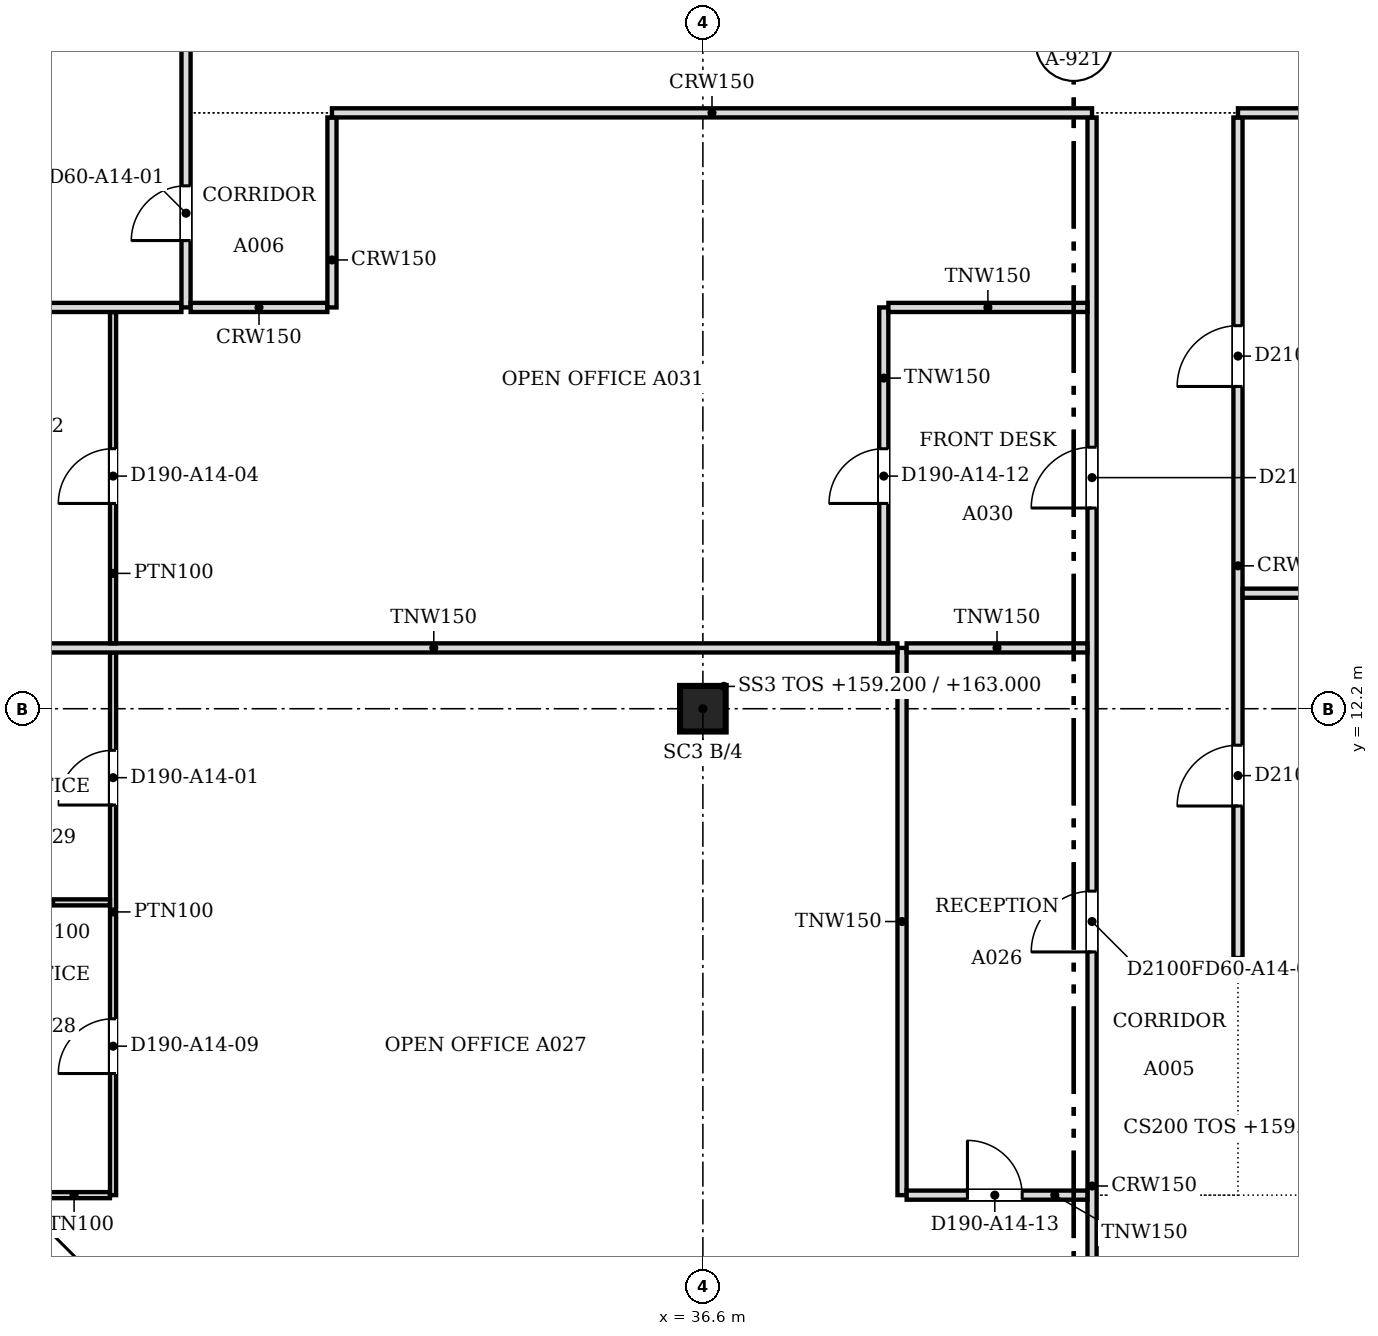
"""IFC4 building model, lengths in metres.
Left out: names, types, materials, properties, quantities, classifications, styles, units other than length and angle.
Written with IfcOpenShell. Run it as: python <this file> out.ifc"""

import sys

from ifc_helpers import new_model, si_unit, direction, frame, frame_2d, origin, origin_2d, place, context, subcontext, project, spatial, polyline, rectangle, outline, extrude, faceted_brep, source, transform, mapped, element, fill, save


model = new_model("IFC4")
c1 = context("Model", 3, precision=1e-05, world=origin(), true_north=direction((0.0, 1.0)))
c2 = subcontext(c1, "Body", "Model", "MODEL_VIEW")
j1 = project(units=[si_unit("LENGTHUNIT", "METRE"), si_unit("PLANEANGLEUNIT", "RADIAN")], contexts=[c1])
p1 = place(None, origin())
s1 = spatial("IfcSite", under=j1, at=p1, CompositionType="ELEMENT")
p2 = place(p1, origin())
s2 = spatial("IfcBuilding", under=s1, at=p2, CompositionType="ELEMENT")
p3 = place(p2, frame((0.0, 0.0, 159.2)))
s3 = spatial("IfcBuildingStorey", under=s2, at=p3, CompositionType="ELEMENT", Elevation=159.2)
p4 = place(p3, frame((36.6, 12.2, 0.0), z_axis=(0.0, 0.0, 1.0), x_axis=(1.0, 0.0, 0.0)))
e1 = element("IfcColumn", 1, at=p4, inside=s3, PredefinedType="COLUMN", context=c2, shape_type="SweptSolid", body=[
    extrude(rectangle(XDim=0.75, YDim=0.75, at=origin_2d()), origin(), (0.0, 0.0, 1.0), 3.6),
])
m1 = source(origin(), c2, "Body", "Brep", [
    faceted_brep([(0.047, -0.25, 0.0), (2.997, -0.25, 3.8), (0.047, -0.25, 7.6), (0.0, -0.25, 7.541), (0.0, -0.25, 0.059), (0.093, 0.25, 7.54), (2.944, 0.25, 3.868), (2.944, 0.25, 3.732), (0.093, 0.25, 0.06), (2.997, 0.0, 3.8), (0.047, 0.0, 0.0), (0.047, 0.0, 7.6)], [[[0, 1, 2, 3, 4]], [[5, 6, 7, 8]], [[8, 7, 9, 1, 0, 10]], [[6, 5, 11, 2, 1, 9]], [[3, 2, 11]], [[10, 0, 4]], [[8, 10, 4, 3, 11, 5]], [[9, 7, 6]]]),
])
p5 = place(p3, frame((24.633, 6.19, -3.8), z_axis=(0.0, 0.0, 1.0), x_axis=(0.359901446078, -0.932990326376, 0.0)))
e2 = element("IfcWall", 2, at=p5, inside=s3, PredefinedType="SOLIDWALL", context=c2, shape_type="MappedRepresentation", body=[
    mapped(m1, transform((0.0, 0.0, 0.0), scale=1.0)),
])
m2 = source(origin(), c2, "Body", "SweptSolid", [
    extrude(outline(polyline([(0.247, 0.665), (2.681, 3.8), (0.247, 6.935), (0.247, 0.665)])), frame((0.0, 0.26, 0.0), z_axis=(0.0, -1.0, 0.0), x_axis=(1.0, 0.0, 0.0)), (0.0, 0.0, 1.0), 0.52),
])
p6 = place(p5, origin())
e3 = element("IfcOpeningElement", 3, at=p6, cuts=e2, PredefinedType="OPENING", context=c2, shape_type="MappedRepresentation", body=[
    mapped(m2, transform((0.0, 0.0, 0.0), scale=1.0)),
])
m3 = source(origin(), c2, "Body", "Brep", [
    faceted_brep([(2.944, -0.25, 0.0), (2.997, -0.25, 0.068), (2.997, -0.25, 7.532), (2.944, -0.25, 7.6), (0.0, -0.25, 3.8), (0.053, 0.25, 3.868), (2.891, 0.25, 7.532), (2.891, 0.25, 0.068), (0.053, 0.25, 3.732), (2.944, 0.0, 0.0), (2.944, 0.0, 7.6), (0.0, 0.0, 3.8)], [[[0, 1, 2, 3, 4]], [[5, 6, 7, 8]], [[1, 0, 9]], [[10, 3, 2]], [[6, 5, 11, 4, 3, 10]], [[8, 7, 9, 0, 4, 11]], [[8, 11, 5]], [[1, 9, 7, 6, 10, 2]]]),
])
p7 = place(p3, frame((25.712, 3.394, -3.8), z_axis=(0.0, 0.0, 1.0), x_axis=(0.707066050402, -0.707147509625, 0.0)))
e4 = element("IfcWall", 4, at=p7, inside=s3, PredefinedType="SOLIDWALL", context=c2, shape_type="MappedRepresentation", body=[
    mapped(m3, transform((0.0, 0.0, 0.0), scale=1.0)),
])
m4 = source(origin(), c2, "Body", "SweptSolid", [
    extrude(outline(polyline([(2.744, 6.934), (0.316, 3.8), (2.744, 0.667), (2.744, 6.934)])), frame((0.0, 0.26, 0.0), z_axis=(0.0, -1.0, 0.0), x_axis=(1.0, 0.0, 0.0)), (0.0, 0.0, 1.0), 0.52),
])
p8 = place(p7, origin())
e5 = element("IfcOpeningElement", 5, at=p8, cuts=e4, PredefinedType="OPENING", context=c2, shape_type="MappedRepresentation", body=[
    mapped(m4, transform((0.0, 0.0, 0.0), scale=1.0)),
])
p9 = place(p2, frame((0.0, 0.0, 163.0)))
s4 = spatial("IfcBuildingStorey", under=s2, at=p9, CompositionType="ELEMENT", Elevation=163.0)
m5 = source(origin(), c2, "Body", "Brep", [
    faceted_brep([(2.95, -0.25, 0.0), (3.003, -0.25, 0.068), (3.003, -0.25, 7.532), (2.95, -0.25, 7.6), (0.0, -0.25, 3.8), (0.047, 0.25, 3.86), (2.898, 0.25, 7.532), (2.898, 0.25, 0.068), (0.047, 0.25, 3.74), (2.95, 0.0, 0.0), (2.95, 0.0, 7.6), (0.0, 0.0, 3.8)], [[[0, 1, 2, 3, 4]], [[5, 6, 7, 8]], [[1, 0, 9]], [[10, 3, 2]], [[6, 5, 11, 4, 3, 10]], [[8, 7, 9, 0, 4, 11]], [[8, 11, 5]], [[1, 9, 7, 6, 10, 2]]]),
])
p10 = place(p9, frame((24.65, 6.146, -3.8), z_axis=(0.0, 0.0, 1.0), x_axis=(0.359953949349, -0.932970071518, 0.0)))
e6 = element("IfcWall", 6, at=p10, inside=s4, PredefinedType="SOLIDWALL", context=c2, shape_type="MappedRepresentation", body=[
    mapped(m5, transform((0.0, 0.0, 0.0), scale=1.0)),
])
m6 = source(origin(), c2, "Body", "SweptSolid", [
    extrude(outline(polyline([(2.75, 6.935), (0.316, 3.8), (2.75, 0.665), (2.75, 6.935)])), frame((0.0, 0.26, 0.0), z_axis=(0.0, -1.0, 0.0), x_axis=(1.0, 0.0, 0.0)), (0.0, 0.0, 1.0), 0.52),
])
p11 = place(p10, origin())
e7 = element("IfcOpeningElement", 7, at=p11, cuts=e6, PredefinedType="OPENING", context=c2, shape_type="MappedRepresentation", body=[
    mapped(m6, transform((0.0, 0.0, 0.0), scale=1.0)),
])
m7 = source(origin(), c2, "Body", "Brep", [
    faceted_brep([(0.053, -0.25, 0.0), (2.997, -0.25, 3.8), (0.053, -0.25, 7.6), (0.0, -0.25, 7.532), (0.0, -0.25, 0.068), (0.106, 0.25, 7.532), (2.944, 0.25, 3.868), (2.944, 0.25, 3.732), (0.106, 0.25, 0.068), (2.997, 0.0, 3.8), (0.053, 0.0, 0.0), (0.053, 0.0, 7.6)], [[[0, 1, 2, 3, 4]], [[5, 6, 7, 8]], [[8, 7, 9, 1, 0, 10]], [[6, 5, 11, 2, 1, 9]], [[3, 2, 11]], [[10, 0, 4]], [[8, 10, 4, 3, 11, 5]], [[9, 7, 6]]]),
])
p12 = place(p9, frame((25.675, 3.431, -3.8), z_axis=(0.0, 0.0, 1.0), x_axis=(0.707106781187, -0.707106781187, 0.0)))
e8 = element("IfcWall", 8, at=p12, inside=s4, PredefinedType="SOLIDWALL", context=c2, shape_type="MappedRepresentation", body=[
    mapped(m7, transform((0.0, 0.0, 0.0), scale=1.0)),
])
m8 = source(origin(), c2, "Body", "SweptSolid", [
    extrude(outline(polyline([(0.253, 0.666), (2.681, 3.8), (0.253, 6.934), (0.253, 0.666)])), frame((0.0, 0.26, 0.0), z_axis=(0.0, -1.0, 0.0), x_axis=(1.0, 0.0, 0.0)), (0.0, 0.0, 1.0), 0.52),
])
p13 = place(p12, origin())
e9 = element("IfcOpeningElement", 9, at=p13, cuts=e8, PredefinedType="OPENING", context=c2, shape_type="MappedRepresentation", body=[
    mapped(m8, transform((0.0, 0.0, 0.0), scale=1.0)),
])
p14 = place(p3, frame((43.0, 0.5, 0.0), z_axis=(0.0, 0.0, 1.0), x_axis=(0.0, 1.0, 0.0)))
e10 = element("IfcWall", 10, at=p14, inside=s3, PredefinedType="PARTITIONING", context=c2, shape_type="SweptSolid", body=[
    extrude(rectangle(XDim=21.424, YDim=0.15, at=frame_2d((10.712, 0.0))), origin(), (0.0, 0.0, 1.0), 3.067),
])
m9 = source(origin(), c2, "Body", "SweptSolid", [
    extrude(rectangle(XDim=1.0, YDim=2.1, at=frame_2d((0.5, 1.05))), frame((0.0, 0.085, 0.0), z_axis=(0.0, -1.0, 0.0), x_axis=(1.0, 0.0, 0.0)), (0.0, 0.0, 1.0), 0.17),
])
p15 = place(p14, frame((15.001, 0.0, 0.0)))
e11 = element("IfcOpeningElement", 11, at=p15, cuts=e10, PredefinedType="OPENING", context=c2, shape_type="MappedRepresentation", body=[
    mapped(m9, transform((0.0, 0.0, 0.0), scale=1.0)),
])
p16 = place(p14, frame((7.7, 0.0, 0.0)))
e12 = element("IfcOpeningElement", 12, at=p16, cuts=e10, PredefinedType="OPENING", context=c2, shape_type="MappedRepresentation", body=[
    mapped(m9, transform((0.0, 0.0, 0.0), scale=1.0)),
])
p17 = place(p3, frame((25.669, 4.2, 0.0), z_axis=(0.0, 0.0, 1.0), x_axis=(1.0, 0.0, 0.0)))
e13 = element("IfcWall", 13, at=p17, inside=s3, PredefinedType="PARTITIONING", context=c2, shape_type="SweptSolid", body=[
    extrude(rectangle(XDim=1.18, YDim=0.1, at=frame_2d((0.59, 0.0))), origin(), (0.0, 0.0, 1.0), 3.067),
])
p18 = place(p3, frame((26.9, 4.2, 0.0), z_axis=(0.0, 0.0, 1.0), x_axis=(0.0, 1.0, 0.0)))
e14 = element("IfcWall", 14, at=p18, inside=s3, PredefinedType="PARTITIONING", context=c2, shape_type="SweptSolid", body=[
    extrude(rectangle(XDim=8.924, YDim=0.1, at=frame_2d((4.462, 0.0))), origin(), (0.0, 0.0, 1.0), 3.067),
])
m10 = source(origin(), c2, "Body", "SweptSolid", [
    extrude(rectangle(XDim=0.9, YDim=2.1, at=frame_2d((0.45, 1.05))), frame((0.0, 0.06, 0.0), z_axis=(0.0, -1.0, 0.0), x_axis=(1.0, 0.0, 0.0)), (0.0, 0.0, 1.0), 0.12),
])
p19 = place(p18, frame((6.416, 0.0, 0.0)))
e15 = element("IfcOpeningElement", 15, at=p19, cuts=e14, PredefinedType="OPENING", context=c2, shape_type="MappedRepresentation", body=[
    mapped(m10, transform((0.0, 0.0, 0.0), scale=1.0)),
])
p20 = place(p18, frame((2.0, 0.0, 0.0)))
e16 = element("IfcOpeningElement", 16, at=p20, cuts=e14, PredefinedType="OPENING", context=c2, shape_type="MappedRepresentation", body=[
    mapped(m10, transform((0.0, 0.0, 0.0), scale=1.0)),
])
p21 = place(p3, frame((39.875, 4.2, 0.0), z_axis=(0.0, 0.0, 1.0), x_axis=(0.0, 1.0, 0.0)))
e17 = element("IfcWall", 17, at=p21, inside=s3, PredefinedType="PARTITIONING", context=c2, shape_type="SweptSolid", body=[
    extrude(rectangle(XDim=9.0, YDim=0.15, at=frame_2d((4.5, 0.0))), origin(), (0.0, 0.0, 1.0), 3.067),
])
p22 = place(p3, frame((42.924, 4.2, 0.0), z_axis=(0.0, 0.0, 1.0), x_axis=(-1.0, 0.0, 0.0)))
e18 = element("IfcWall", 18, at=p22, inside=s3, PredefinedType="PARTITIONING", context=c2, shape_type="SweptSolid", body=[
    extrude(rectangle(XDim=2.973, YDim=0.15, at=frame_2d((1.487, 0.0))), origin(), (0.0, 0.0, 1.0), 3.067),
])
m11 = source(origin(), c2, "Body", "SweptSolid", [
    extrude(rectangle(XDim=0.9, YDim=2.1, at=frame_2d((0.45, 1.05))), frame((0.0, 0.085, 0.0), z_axis=(0.0, -1.0, 0.0), x_axis=(1.0, 0.0, 0.0)), (0.0, 0.0, 1.0), 0.17),
])
p23 = place(p22, frame((1.073, 0.0, 0.0)))
e19 = element("IfcOpeningElement", 19, at=p23, cuts=e18, PredefinedType="OPENING", context=c2, shape_type="MappedRepresentation", body=[
    mapped(m11, transform((0.0, 0.0, 0.0), scale=1.0)),
])
p24 = place(p3, frame((45.4, 21.924, 0.0), z_axis=(0.0, 0.0, 1.0), x_axis=(0.0, -1.0, 0.0)))
e20 = element("IfcWall", 20, at=p24, inside=s3, PredefinedType="PARTITIONING", context=c2, shape_type="SweptSolid", body=[
    extrude(rectangle(XDim=13.824, YDim=0.15, at=frame_2d((6.912, 0.0))), origin(), (0.0, 0.0, 1.0), 3.067),
])
p25 = place(p24, frame((10.324, 0.0, 0.0)))
e21 = element("IfcOpeningElement", 21, at=p25, cuts=e20, PredefinedType="OPENING", context=c2, shape_type="MappedRepresentation", body=[
    mapped(m9, transform((0.0, 0.0, 0.0), scale=1.0)),
])
p26 = place(p24, frame((3.424, 0.0, 0.0)))
e22 = element("IfcOpeningElement", 22, at=p26, cuts=e20, PredefinedType="OPENING", context=c2, shape_type="MappedRepresentation", body=[
    mapped(m9, transform((0.0, 0.0, 0.0), scale=1.0)),
])
p27 = place(p3, frame((24.9, 9.015, 0.0), z_axis=(0.0, 0.0, 1.0), x_axis=(1.0, 0.0, 0.0)))
e23 = element("IfcWall", 23, at=p27, inside=s3, PredefinedType="PARTITIONING", context=c2, shape_type="SweptSolid", body=[
    extrude(rectangle(XDim=1.949, YDim=0.1, at=frame_2d((0.975, 0.0))), origin(), (0.0, 0.0, 1.0), 3.067),
])
p28 = place(p3, frame((24.55, 13.2, 0.0), z_axis=(0.0, 0.0, 1.0), x_axis=(1.0, 0.0, 0.0)))
e24 = element("IfcWall", 24, at=p28, inside=s3, PredefinedType="PARTITIONING", context=c2, shape_type="SweptSolid", body=[
    extrude(rectangle(XDim=15.249, YDim=0.15, at=frame_2d((7.625, 0.0))), origin(), (0.0, 0.0, 1.0), 3.067),
])
p29 = place(p3, frame((39.951, 13.2, 0.0), z_axis=(0.0, 0.0, 1.0), x_axis=(1.0, 0.0, 0.0)))
e25 = element("IfcWall", 25, at=p29, inside=s3, PredefinedType="PARTITIONING", context=c2, shape_type="SweptSolid", body=[
    extrude(rectangle(XDim=2.973, YDim=0.15, at=frame_2d((1.487, 0.0))), origin(), (0.0, 0.0, 1.0), 3.067),
])
p30 = place(p3, frame((26.9, 13.276, 0.0), z_axis=(0.0, 0.0, 1.0), x_axis=(0.0, 1.0, 0.0)))
e26 = element("IfcWall", 26, at=p30, inside=s3, PredefinedType="PARTITIONING", context=c2, shape_type="SweptSolid", body=[
    extrude(rectangle(XDim=5.448, YDim=0.1, at=frame_2d((2.724, 0.0))), origin(), (0.0, 0.0, 1.0), 3.067),
])
p31 = place(p30, frame((2.3, 0.0, 0.0)))
e27 = element("IfcOpeningElement", 27, at=p31, cuts=e26, PredefinedType="OPENING", context=c2, shape_type="MappedRepresentation", body=[
    mapped(m10, transform((0.0, 0.0, 0.0), scale=1.0)),
])
p32 = place(p3, frame((39.575, 13.276, 0.0), z_axis=(0.0, 0.0, 1.0), x_axis=(0.0, 1.0, 0.0)))
e28 = element("IfcWall", 28, at=p32, inside=s3, PredefinedType="PARTITIONING", context=c2, shape_type="SweptSolid", body=[
    extrude(rectangle(XDim=5.524, YDim=0.15, at=frame_2d((2.762, 0.0))), origin(), (0.0, 0.0, 1.0), 3.067),
])
p33 = place(p32, frame((2.3, 0.0, 0.0)))
e29 = element("IfcOpeningElement", 29, at=p33, cuts=e28, PredefinedType="OPENING", context=c2, shape_type="MappedRepresentation", body=[
    mapped(m11, transform((0.0, 0.0, 0.0), scale=1.0)),
])
p34 = place(p3, frame((45.476, 14.1, 0.0), z_axis=(0.0, 0.0, 1.0), x_axis=(1.0, 0.0, 0.0)))
e30 = element("IfcWall", 30, at=p34, inside=s3, PredefinedType="PARTITIONING", context=c2, shape_type="SweptSolid", body=[
    extrude(rectangle(XDim=15.024, YDim=0.15, at=frame_2d((7.512, 0.0))), origin(), (0.0, 0.0, 1.0), 3.067),
])
p35 = place(p3, frame((22.0, 18.8, 0.0), z_axis=(0.0, 0.0, 1.0), x_axis=(1.0, 0.0, 0.0)))
e31 = element("IfcWall", 31, at=p35, inside=s3, PredefinedType="PARTITIONING", context=c2, shape_type="SweptSolid", body=[
    extrude(rectangle(XDim=6.024, YDim=0.15, at=frame_2d((3.012, 0.0))), origin(), (0.0, 0.0, 1.0), 3.067),
])
p36 = place(p3, frame((28.1, 18.8, 0.0), z_axis=(0.0, 0.0, 1.0), x_axis=(0.0, 1.0, 0.0)))
e32 = element("IfcWall", 32, at=p36, inside=s3, PredefinedType="PARTITIONING", context=c2, shape_type="SweptSolid", body=[
    extrude(rectangle(XDim=26.5, YDim=0.15, at=frame_2d((13.25, 0.0))), origin(), (0.0, 0.0, 1.0), 3.067),
])
p37 = place(p36, frame((1.1, 0.0, 0.0)))
e33 = element("IfcOpeningElement", 33, at=p37, cuts=e32, PredefinedType="OPENING", context=c2, shape_type="MappedRepresentation", body=[
    mapped(m11, transform((0.0, 0.0, 0.0), scale=1.0)),
])
p38 = place(p36, frame((23.151, 0.0, 0.0)))
e34 = element("IfcOpeningElement", 34, at=p38, cuts=e32, PredefinedType="OPENING", context=c2, shape_type="MappedRepresentation", body=[
    mapped(m9, transform((0.0, 0.0, 0.0), scale=1.0)),
])
p39 = place(p36, frame((8.1, 0.0, 0.0)))
e35 = element("IfcOpeningElement", 35, at=p39, cuts=e32, PredefinedType="OPENING", context=c2, shape_type="MappedRepresentation", body=[
    mapped(m9, transform((0.0, 0.0, 0.0), scale=1.0)),
])
p40 = place(p36, frame((15.8, 0.0, 0.0)))
e36 = element("IfcOpeningElement", 36, at=p40, cuts=e32, PredefinedType="OPENING", context=c2, shape_type="MappedRepresentation", body=[
    mapped(m11, transform((0.0, 0.0, 0.0), scale=1.0)),
])
p41 = place(p3, frame((28.176, 18.8, 0.0), z_axis=(0.0, 0.0, 1.0), x_axis=(1.0, 0.0, 0.0)))
e37 = element("IfcWall", 37, at=p41, inside=s3, PredefinedType="PARTITIONING", context=c2, shape_type="SweptSolid", body=[
    extrude(rectangle(XDim=2.248, YDim=0.15, at=frame_2d((1.124, 0.0))), origin(), (0.0, 0.0, 1.0), 3.067),
])
p42 = place(p3, frame((30.5, 18.8, 0.0), z_axis=(0.0, 0.0, 1.0), x_axis=(0.0, 1.0, 0.0)))
e38 = element("IfcWall", 38, at=p42, inside=s3, PredefinedType="PARTITIONING", context=c2, shape_type="SweptSolid", body=[
    extrude(rectangle(XDim=3.124, YDim=0.15, at=frame_2d((1.562, 0.0))), origin(), (0.0, 0.0, 1.0), 3.067),
])
p43 = place(p3, frame((39.651, 18.8, 0.0), z_axis=(0.0, 0.0, 1.0), x_axis=(1.0, 0.0, 0.0)))
e39 = element("IfcWall", 39, at=p43, inside=s3, PredefinedType="PARTITIONING", context=c2, shape_type="SweptSolid", body=[
    extrude(rectangle(XDim=3.273, YDim=0.15, at=frame_2d((1.637, 0.0))), origin(), (0.0, 0.0, 1.0), 3.067),
])
p44 = place(p3, frame((30.5, 22.0, 0.0), z_axis=(0.0, 0.0, 1.0), x_axis=(1.0, 0.0, 0.0)))
e40 = element("IfcWall", 40, at=p44, inside=s3, PredefinedType="PARTITIONING", context=c2, shape_type="SweptSolid", body=[
    extrude(rectangle(XDim=12.5, YDim=0.15, at=frame_2d((6.25, 0.0))), origin(), (0.0, 0.0, 1.0), 3.067),
])
p45 = place(p3, frame((45.4, 22.0, 0.0), z_axis=(0.0, 0.0, 1.0), x_axis=(1.0, 0.0, 0.0)))
e41 = element("IfcWall", 41, at=p45, inside=s3, PredefinedType="PARTITIONING", context=c2, shape_type="SweptSolid", body=[
    extrude(rectangle(XDim=11.9, YDim=0.15, at=frame_2d((5.95, 0.0))), origin(), (0.0, 0.0, 1.0), 3.067),
])
m12 = source(origin(), c2, "Body", "SweptSolid", [
    extrude(rectangle(XDim=0.9, YDim=2.1, at=frame_2d((0.45, 1.05))), frame((0.0, 0.025, 0.0), z_axis=(0.0, -1.0, 0.0), x_axis=(1.0, 0.0, 0.0)), (0.0, 0.0, 1.0), 0.05),
])
p46 = place(p37, origin())
e42 = element("IfcDoor", 42, at=p46, inside=s3, OperationType="SINGLE_SWING_LEFT", PredefinedType="DOOR", context=c2, shape_type="MappedRepresentation", body=[
    mapped(m12, transform((0.0, 0.0, 0.0), scale=1.0)),
])
fill(e33, e42)
p47 = place(p19, origin())
e43 = element("IfcDoor", 43, at=p47, inside=s3, OperationType="SINGLE_SWING_LEFT", PredefinedType="DOOR", context=c2, shape_type="MappedRepresentation", body=[
    mapped(m12, transform((0.0, 0.0, 0.0), scale=1.0)),
])
fill(e15, e43)
p48 = place(p31, origin())
e44 = element("IfcDoor", 44, at=p48, inside=s3, OperationType="SINGLE_SWING_LEFT", PredefinedType="DOOR", context=c2, shape_type="MappedRepresentation", body=[
    mapped(m12, transform((0.0, 0.0, 0.0), scale=1.0)),
])
fill(e27, e44)
m13 = source(origin(), c2, "Body", "SweptSolid", [
    extrude(rectangle(XDim=1.0, YDim=2.1, at=frame_2d((0.5, 1.05))), frame((0.0, 0.025, 0.0), z_axis=(0.0, -1.0, 0.0), x_axis=(1.0, 0.0, 0.0)), (0.0, 0.0, 1.0), 0.05),
])
p49 = place(p15, origin())
e45 = element("IfcDoor", 45, at=p49, inside=s3, OperationType="SINGLE_SWING_LEFT", PredefinedType="DOOR", context=c2, shape_type="MappedRepresentation", body=[
    mapped(m13, transform((0.0, 0.0, 0.0), scale=1.0)),
])
fill(e11, e45)
p50 = place(p20, origin())
e46 = element("IfcDoor", 46, at=p50, inside=s3, OperationType="SINGLE_SWING_LEFT", PredefinedType="DOOR", context=c2, shape_type="MappedRepresentation", body=[
    mapped(m12, transform((0.0, 0.0, 0.0), scale=1.0)),
])
fill(e16, e46)
p51 = place(p25, origin())
e47 = element("IfcDoor", 47, at=p51, inside=s3, OperationType="SINGLE_SWING_RIGHT", PredefinedType="DOOR", context=c2, shape_type="MappedRepresentation", body=[
    mapped(m13, transform((0.0, 0.0, 0.0), scale=1.0)),
])
fill(e21, e47)
p52 = place(p26, origin())
e48 = element("IfcDoor", 48, at=p52, inside=s3, OperationType="SINGLE_SWING_RIGHT", PredefinedType="DOOR", context=c2, shape_type="MappedRepresentation", body=[
    mapped(m13, transform((0.0, 0.0, 0.0), scale=1.0)),
])
fill(e22, e48)
p53 = place(p33, origin())
e49 = element("IfcDoor", 49, at=p53, inside=s3, OperationType="SINGLE_SWING_LEFT", PredefinedType="DOOR", context=c2, shape_type="MappedRepresentation", body=[
    mapped(m12, transform((0.0, 0.0, 0.0), scale=1.0)),
])
fill(e29, e49)
p54 = place(p16, origin())
e50 = element("IfcDoor", 50, at=p54, inside=s3, OperationType="SINGLE_SWING_LEFT", PredefinedType="DOOR", context=c2, shape_type="MappedRepresentation", body=[
    mapped(m13, transform((0.0, 0.0, 0.0), scale=1.0)),
])
fill(e12, e50)
p55 = place(p23, origin())
e51 = element("IfcDoor", 51, at=p55, inside=s3, OperationType="SINGLE_SWING_RIGHT", PredefinedType="DOOR", context=c2, shape_type="MappedRepresentation", body=[
    mapped(m12, transform((0.0, 0.0, 0.0), scale=1.0)),
])
fill(e19, e51)
save(model, sys.argv[1])
